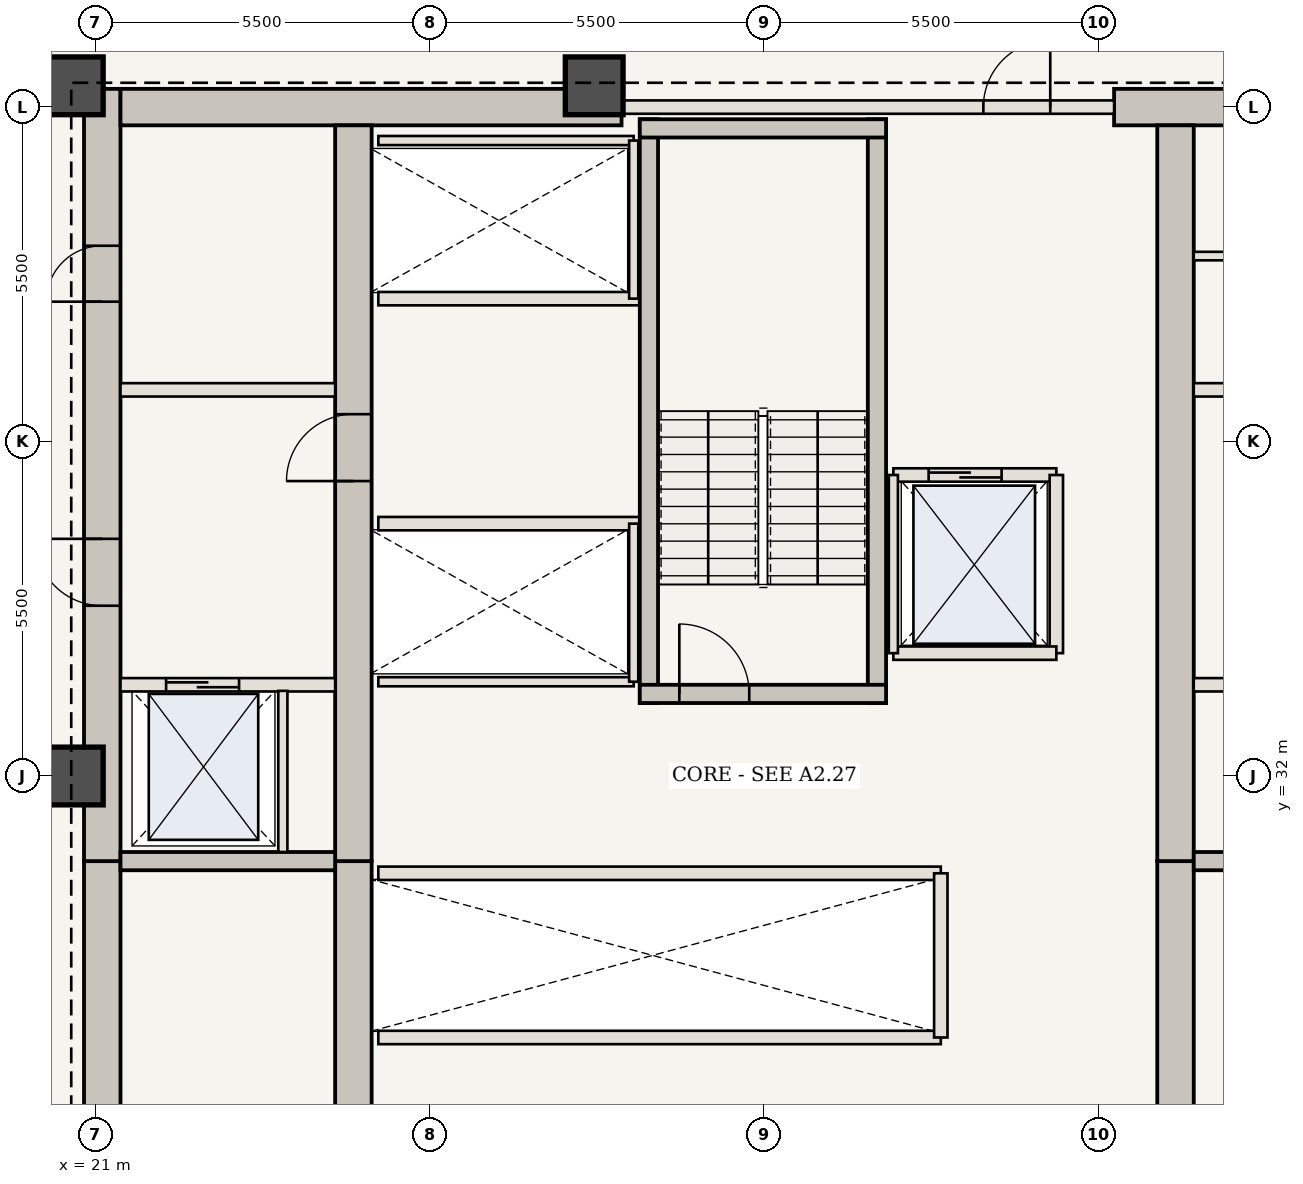
"""IFC4 building model, lengths in metres.
Left out: names, types, materials, properties, quantities, classifications, styles, units other than length and angle.
Written with IfcOpenShell. Run it as: python <this file> out.ifc"""

import sys

from ifc_helpers import new_model, si_unit, direction, frame, frame_2d, origin, origin_2d, place, context, subcontext, project, spatial, rectangle, extrude, element, fill, save


model = new_model("IFC4")
c1 = context("Model", 3, precision=1e-05, world=origin(), true_north=direction((0.0, 1.0)))
c2 = subcontext(c1, "Body", "Model", "MODEL_VIEW")
j1 = project(units=[si_unit("LENGTHUNIT", "METRE"), si_unit("PLANEANGLEUNIT", "RADIAN")], contexts=[c1])
p1 = place(None, origin())
s1 = spatial("IfcSite", under=j1, at=p1, CompositionType="ELEMENT")
p2 = place(p1, origin())
s2 = spatial("IfcBuilding", under=s1, at=p2, CompositionType="ELEMENT")
p3 = place(p2, frame((0.0, 0.0, 114.45)))
s3 = spatial("IfcBuildingStorey", under=s2, at=p3, CompositionType="ELEMENT", Elevation=114.45)
p4 = place(p3, frame((21.11, 20.65, 0.0), z_axis=(0.0, 0.0, 1.0), x_axis=(0.0, 1.0, 0.0)))
e1 = element("IfcWall", 1, at=p4, inside=s3, PredefinedType="SHEAR", context=c2, shape_type="SweptSolid", body=[
    extrude(rectangle(XDim=9.95, YDim=0.6, at=frame_2d((4.975, 0.0))), origin(), (0.0, 0.0, 1.0), 3.85),
])
p5 = place(p4, frame((1.1, 0.0, 0.0)))
e2 = element("IfcOpeningElement", 2, at=p5, cuts=e1, PredefinedType="OPENING", context=c2, shape_type="SweptSolid", body=[
    extrude(rectangle(XDim=1.15, YDim=2.15, at=frame_2d((0.575, 1.075))), frame((0.0, 0.31, 0.0), z_axis=(0.0, -1.0, 0.0), x_axis=(1.0, 0.0, 0.0)), (0.0, 0.0, 1.0), 0.62),
])
p6 = place(p3, frame((21.11, 30.6, 0.0), z_axis=(0.0, 0.0, 1.0), x_axis=(0.0, 1.0, 0.0)))
e3 = element("IfcWall", 3, at=p6, inside=s3, PredefinedType="SHEAR", context=c2, shape_type="SweptSolid", body=[
    extrude(rectangle(XDim=12.7, YDim=0.6, at=frame_2d((6.35, 0.0))), origin(), (0.0, 0.0, 1.0), 3.85),
])
p7 = place(p6, frame((4.2, 0.0, 0.0)))
e4 = element("IfcOpeningElement", 4, at=p7, cuts=e3, PredefinedType="OPENING", context=c2, shape_type="SweptSolid", body=[
    extrude(rectangle(XDim=1.1, YDim=2.15, at=frame_2d((0.55, 1.075))), frame((0.0, 0.31, 0.0), z_axis=(0.0, -1.0, 0.0), x_axis=(1.0, 0.0, 0.0)), (0.0, 0.0, 1.0), 0.62),
])
p8 = place(p6, frame((9.2, 0.0, 0.0)))
e5 = element("IfcOpeningElement", 5, at=p8, cuts=e3, PredefinedType="OPENING", context=c2, shape_type="SweptSolid", body=[
    extrude(rectangle(XDim=0.92, YDim=2.1, at=frame_2d((0.46, 1.05))), frame((0.0, 0.31, 0.0), z_axis=(0.0, -1.0, 0.0), x_axis=(1.0, 0.0, 0.0)), (0.0, 0.0, 1.0), 0.62),
])
p9 = place(p3, frame((21.41, 43.0, 0.0), z_axis=(0.0, 0.0, 1.0), x_axis=(1.0, 0.0, 0.0)))
e6 = element("IfcWall", 6, at=p9, inside=s3, PredefinedType="SHEAR", context=c2, shape_type="SweptSolid", body=[
    extrude(rectangle(XDim=8.24, YDim=0.6, at=frame_2d((4.12, 0.0))), origin(), (0.0, 0.0, 1.0), 3.85),
])
p10 = place(p3, frame((37.75, 43.0, 0.0), z_axis=(0.0, 0.0, 1.0), x_axis=(1.0, 0.0, 0.0)))
e7 = element("IfcWall", 7, at=p10, inside=s3, PredefinedType="SHEAR", context=c2, shape_type="SweptSolid", body=[
    extrude(rectangle(XDim=4.84, YDim=0.6, at=frame_2d((2.42, 0.0))), origin(), (0.0, 0.0, 1.0), 3.85),
])
p11 = place(p3, frame((25.24, 21.25, 0.0), z_axis=(0.0, 0.0, 1.0), x_axis=(0.0, 1.0, 0.0)))
e8 = element("IfcWall", 8, at=p11, inside=s3, PredefinedType="SHEAR", context=c2, shape_type="SweptSolid", body=[
    extrude(rectangle(XDim=9.35, YDim=0.6, at=frame_2d((4.675, 0.0))), origin(), (0.0, 0.0, 1.0), 3.85),
])
p12 = place(p3, frame((25.24, 30.6, 0.0), z_axis=(0.0, 0.0, 1.0), x_axis=(0.0, 1.0, 0.0)))
e9 = element("IfcWall", 9, at=p12, inside=s3, PredefinedType="SHEAR", context=c2, shape_type="SweptSolid", body=[
    extrude(rectangle(XDim=12.1, YDim=0.6, at=frame_2d((6.05, 0.0))), origin(), (0.0, 0.0, 1.0), 3.85),
])
p13 = place(p12, frame((6.25, 0.0, 0.0)))
e10 = element("IfcOpeningElement", 10, at=p13, cuts=e9, PredefinedType="OPENING", context=c2, shape_type="SweptSolid", body=[
    extrude(rectangle(XDim=1.1, YDim=2.15, at=frame_2d((0.55, 1.075))), frame((0.0, 0.31, 0.0), z_axis=(0.0, -1.0, 0.0), x_axis=(1.0, 0.0, 0.0)), (0.0, 0.0, 1.0), 0.62),
])
p14 = place(p3, frame((38.76, 21.25, 0.0), z_axis=(0.0, 0.0, 1.0), x_axis=(0.0, 1.0, 0.0)))
e11 = element("IfcWall", 11, at=p14, inside=s3, PredefinedType="SHEAR", context=c2, shape_type="SweptSolid", body=[
    extrude(rectangle(XDim=9.35, YDim=0.6, at=frame_2d((4.675, 0.0))), origin(), (0.0, 0.0, 1.0), 3.85),
])
p15 = place(p3, frame((38.76, 30.6, 0.0), z_axis=(0.0, 0.0, 1.0), x_axis=(0.0, 1.0, 0.0)))
e12 = element("IfcWall", 12, at=p15, inside=s3, PredefinedType="SHEAR", context=c2, shape_type="SweptSolid", body=[
    extrude(rectangle(XDim=12.1, YDim=0.6, at=frame_2d((6.05, 0.0))), origin(), (0.0, 0.0, 1.0), 3.85),
])
for number, where, z_axis, x_axis in (
    (13, (29.2, 43.35, 0.0), (0.0, 0.0, 1.0), (1.0, 0.0, 0.0)),
    (14, (20.65, 43.35, 0.0), (0.0, 0.0, 1.0), (1.0, 0.0, 0.0)),
    (15, (20.65, 32.0, 0.0), (0.0, 0.0, 1.0), (1.0, 0.0, 0.0)),
):
    element("IfcColumn", number, at=place(p3, frame(where, z_axis=z_axis, x_axis=x_axis)), inside=s3, PredefinedType="COLUMN", context=c2, shape_type="SweptSolid", body=[
        extrude(rectangle(XDim=0.95, YDim=0.95, at=origin_2d()), origin(), (0.0, 0.0, 1.0), 3.85),
    ])
for number, where, z_axis, x_axis in (
    (16, (21.41, 30.6, 0.0), (0.0, 0.0, 1.0), (1.0, 0.0, 0.0)),
    (17, (39.06, 30.6, 0.0), (0.0, 0.0, 1.0), (1.0, 0.0, 0.0)),
):
    element("IfcWall", number, at=place(p3, frame(where, z_axis=z_axis, x_axis=x_axis)), inside=s3, PredefinedType="SHEAR", context=c2, shape_type="SweptSolid", body=[
        extrude(rectangle(XDim=3.53, YDim=0.3, at=frame_2d((1.765, 0.0))), origin(), (0.0, 0.0, 1.0), 3.685),
    ])
p16 = place(p3, frame((21.41, 33.5, 0.0), z_axis=(0.0, 0.0, 1.0), x_axis=(1.0, 0.0, 0.0)))
e18 = element("IfcWall", 18, at=p16, inside=s3, PredefinedType="STANDARD", context=c2, shape_type="SweptSolid", body=[
    extrude(rectangle(XDim=3.53, YDim=0.22, at=frame_2d((1.765, 0.0))), origin(), (0.0, 0.0, 1.0), 3.685),
])
p17 = place(p16, frame((0.75, 0.0, 0.0)))
e19 = element("IfcOpeningElement", 19, at=p17, cuts=e18, PredefinedType="OPENING", context=c2, shape_type="SweptSolid", body=[
    extrude(rectangle(XDim=1.2, YDim=2.2, at=frame_2d((0.6, 1.1))), frame((0.0, 0.12, 0.0), z_axis=(0.0, -1.0, 0.0), x_axis=(1.0, 0.0, 0.0)), (0.0, 0.0, 1.0), 0.24),
])
p18 = place(p3, frame((24.08, 30.75, 0.0), z_axis=(0.0, 0.0, 1.0), x_axis=(0.0, 1.0, 0.0)))
e20 = element("IfcWall", 20, at=p18, inside=s3, PredefinedType="STANDARD", context=c2, shape_type="SweptSolid", body=[
    extrude(rectangle(XDim=2.65, YDim=0.15, at=frame_2d((1.325, 0.0))), origin(), (0.0, 0.0, 1.0), 3.685),
])
p19 = place(p3, frame((39.06, 33.5, 0.0), z_axis=(0.0, 0.0, 1.0), x_axis=(1.0, 0.0, 0.0)))
e21 = element("IfcWall", 21, at=p19, inside=s3, PredefinedType="STANDARD", context=c2, shape_type="SweptSolid", body=[
    extrude(rectangle(XDim=3.53, YDim=0.22, at=frame_2d((1.765, 0.0))), origin(), (0.0, 0.0, 1.0), 3.685),
])
p20 = place(p19, frame((1.55, 0.0, 0.0)))
e22 = element("IfcOpeningElement", 22, at=p20, cuts=e21, PredefinedType="OPENING", context=c2, shape_type="SweptSolid", body=[
    extrude(rectangle(XDim=1.2, YDim=2.2, at=frame_2d((0.6, 1.1))), frame((0.0, 0.12, 0.0), z_axis=(0.0, -1.0, 0.0), x_axis=(1.0, 0.0, 0.0)), (0.0, 0.0, 1.0), 0.24),
])
for number, where, z_axis, x_axis in (
    (23, (21.41, 38.35, 0.0), (0.0, 0.0, 1.0), (1.0, 0.0, 0.0)),
    (24, (39.06, 38.35, 0.0), (0.0, 0.0, 1.0), (1.0, 0.0, 0.0)),
):
    element("IfcWall", number, at=place(p3, frame(where, z_axis=z_axis, x_axis=x_axis)), inside=s3, PredefinedType="STANDARD", context=c2, shape_type="SweptSolid", body=[
        extrude(rectangle(XDim=3.53, YDim=0.22, at=frame_2d((1.765, 0.0))), origin(), (0.0, 0.0, 1.0), 3.685),
    ])
p21 = place(p3, frame((39.06, 40.55, 0.0), z_axis=(0.0, 0.0, 1.0), x_axis=(1.0, 0.0, 0.0)))
e25 = element("IfcWall", 25, at=p21, inside=s3, PredefinedType="STANDARD", context=c2, shape_type="SweptSolid", body=[
    extrude(rectangle(XDim=3.53, YDim=0.14, at=frame_2d((1.765, 0.0))), origin(), (0.0, 0.0, 1.0), 3.685),
])
for number, where, z_axis, x_axis in (
    (26, (25.65, 27.7, 0.0), (0.0, 0.0, 1.0), (1.0, 0.0, 0.0)),
    (27, (25.65, 30.4, 0.0), (0.0, 0.0, 1.0), (1.0, 0.0, 0.0)),
):
    element("IfcWall", number, at=place(p3, frame(where, z_axis=z_axis, x_axis=x_axis)), inside=s3, PredefinedType="STANDARD", context=c2, shape_type="SweptSolid", body=[
        extrude(rectangle(XDim=9.25, YDim=0.22, at=frame_2d((4.625, 0.0))), origin(), (0.0, 0.0, 1.0), 3.685),
    ])
p22 = place(p3, frame((34.9, 27.7, 0.0), z_axis=(0.0, 0.0, 1.0), x_axis=(0.0, 1.0, 0.0)))
e28 = element("IfcWall", 28, at=p22, inside=s3, PredefinedType="STANDARD", context=c2, shape_type="SweptSolid", body=[
    extrude(rectangle(XDim=2.7, YDim=0.22, at=frame_2d((1.35, 0.0))), origin(), (0.0, 0.0, 1.0), 3.685),
])
p23 = place(p3, frame((25.65, 36.15, 0.0), z_axis=(0.0, 0.0, 1.0), x_axis=(1.0, 0.0, 0.0)))
e29 = element("IfcWall", 29, at=p23, inside=s3, PredefinedType="STANDARD", context=c2, shape_type="SweptSolid", body=[
    extrude(rectangle(XDim=4.3, YDim=0.22, at=frame_2d((2.15, 0.0))), origin(), (0.0, 0.0, 1.0), 3.685),
])
p24 = place(p3, frame((25.65, 33.55, 0.0), z_axis=(0.0, 0.0, 1.0), x_axis=(1.0, 0.0, 0.0)))
e30 = element("IfcWall", 30, at=p24, inside=s3, PredefinedType="STANDARD", context=c2, shape_type="SweptSolid", body=[
    extrude(rectangle(XDim=4.2, YDim=0.15, at=frame_2d((2.1, 0.0))), origin(), (0.0, 0.0, 1.0), 3.685),
])
p25 = place(p3, frame((29.85, 33.55, 0.0), z_axis=(0.0, 0.0, 1.0), x_axis=(0.0, 1.0, 0.0)))
e31 = element("IfcWall", 31, at=p25, inside=s3, PredefinedType="STANDARD", context=c2, shape_type="SweptSolid", body=[
    extrude(rectangle(XDim=2.6, YDim=0.15, at=frame_2d((1.3, 0.0))), origin(), (0.0, 0.0, 1.0), 3.685),
])
p26 = place(p3, frame((25.65, 39.85, 0.0), z_axis=(0.0, 0.0, 1.0), x_axis=(1.0, 0.0, 0.0)))
e32 = element("IfcWall", 32, at=p26, inside=s3, PredefinedType="STANDARD", context=c2, shape_type="SweptSolid", body=[
    extrude(rectangle(XDim=4.3, YDim=0.22, at=frame_2d((2.15, 0.0))), origin(), (0.0, 0.0, 1.0), 3.685),
])
p27 = place(p3, frame((25.65, 42.45, 0.0), z_axis=(0.0, 0.0, 1.0), x_axis=(1.0, 0.0, 0.0)))
e33 = element("IfcWall", 33, at=p27, inside=s3, PredefinedType="STANDARD", context=c2, shape_type="SweptSolid", body=[
    extrude(rectangle(XDim=4.2, YDim=0.15, at=frame_2d((2.1, 0.0))), origin(), (0.0, 0.0, 1.0), 3.685),
])
p28 = place(p3, frame((29.85, 39.85, 0.0), z_axis=(0.0, 0.0, 1.0), x_axis=(0.0, 1.0, 0.0)))
e34 = element("IfcWall", 34, at=p28, inside=s3, PredefinedType="STANDARD", context=c2, shape_type="SweptSolid", body=[
    extrude(rectangle(XDim=2.6, YDim=0.15, at=frame_2d((1.3, 0.0))), origin(), (0.0, 0.0, 1.0), 3.685),
])
for number, where, z_axis, x_axis in (
    (35, (30.1, 33.2, 0.0), (0.0, 0.0, 1.0), (0.0, 1.0, 0.0)),
    (36, (33.85, 33.2, 0.0), (0.0, 0.0, 1.0), (0.0, 1.0, 0.0)),
):
    element("IfcWall", number, at=place(p3, frame(where, z_axis=z_axis, x_axis=x_axis)), inside=s3, PredefinedType="SHEAR", context=c2, shape_type="SweptSolid", body=[
        extrude(rectangle(XDim=9.6, YDim=0.3, at=frame_2d((4.8, 0.0))), origin(), (0.0, 0.0, 1.0), 3.685),
    ])
p29 = place(p3, frame((29.95, 33.35, 0.0), z_axis=(0.0, 0.0, 1.0), x_axis=(1.0, 0.0, 0.0)))
e37 = element("IfcWall", 37, at=p29, inside=s3, PredefinedType="SHEAR", context=c2, shape_type="SweptSolid", body=[
    extrude(rectangle(XDim=4.05, YDim=0.3, at=frame_2d((2.025, 0.0))), origin(), (0.0, 0.0, 1.0), 3.685),
])
p30 = place(p29, frame((0.65, 0.0, 0.0)))
e38 = element("IfcOpeningElement", 38, at=p30, cuts=e37, PredefinedType="OPENING", context=c2, shape_type="SweptSolid", body=[
    extrude(rectangle(XDim=1.15, YDim=2.15, at=frame_2d((0.575, 1.075))), frame((0.0, 0.16, 0.0), z_axis=(0.0, -1.0, 0.0), x_axis=(1.0, 0.0, 0.0)), (0.0, 0.0, 1.0), 0.32),
])
p31 = place(p3, frame((29.95, 42.65, 0.0), z_axis=(0.0, 0.0, 1.0), x_axis=(1.0, 0.0, 0.0)))
e39 = element("IfcWall", 39, at=p31, inside=s3, PredefinedType="SHEAR", context=c2, shape_type="SweptSolid", body=[
    extrude(rectangle(XDim=4.05, YDim=0.3, at=frame_2d((2.025, 0.0))), origin(), (0.0, 0.0, 1.0), 3.685),
])
p32 = place(p3, frame((29.65, 43.0, 0.0), z_axis=(0.0, 0.0, 1.0), x_axis=(1.0, 0.0, 0.0)))
e40 = element("IfcWall", 40, at=p32, inside=s3, PredefinedType="STANDARD", context=c2, shape_type="SweptSolid", body=[
    extrude(rectangle(XDim=8.1, YDim=0.22, at=frame_2d((4.05, 0.0))), origin(), (0.0, 0.0, 1.0), 3.685),
])
p33 = place(p32, frame((5.95, 0.0, 0.0)))
e41 = element("IfcOpeningElement", 41, at=p33, cuts=e40, PredefinedType="OPENING", context=c2, shape_type="SweptSolid", body=[
    extrude(rectangle(XDim=1.1, YDim=2.15, at=frame_2d((0.55, 1.075))), frame((0.0, 0.12, 0.0), z_axis=(0.0, -1.0, 0.0), x_axis=(1.0, 0.0, 0.0)), (0.0, 0.0, 1.0), 0.24),
])
p34 = place(p3, frame((34.12, 36.95, 0.0), z_axis=(0.0, 0.0, 1.0), x_axis=(1.0, 0.0, 0.0)))
e42 = element("IfcWall", 42, at=p34, inside=s3, PredefinedType="STANDARD", context=c2, shape_type="SweptSolid", body=[
    extrude(rectangle(XDim=2.68, YDim=0.22, at=frame_2d((1.34, 0.0))), origin(), (0.0, 0.0, 1.0), 3.685),
])
p35 = place(p34, frame((0.58, 0.0, 0.0)))
e43 = element("IfcOpeningElement", 43, at=p35, cuts=e42, PredefinedType="OPENING", context=c2, shape_type="SweptSolid", body=[
    extrude(rectangle(XDim=1.2, YDim=2.2, at=frame_2d((0.6, 1.1))), frame((0.0, 0.12, 0.0), z_axis=(0.0, -1.0, 0.0), x_axis=(1.0, 0.0, 0.0)), (0.0, 0.0, 1.0), 0.24),
])
p36 = place(p3, frame((36.8, 34.02, 0.0), z_axis=(0.0, 0.0, 1.0), x_axis=(0.0, 1.0, 0.0)))
e44 = element("IfcWall", 44, at=p36, inside=s3, PredefinedType="STANDARD", context=c2, shape_type="SweptSolid", body=[
    extrude(rectangle(XDim=2.93, YDim=0.22, at=frame_2d((1.465, 0.0))), origin(), (0.0, 0.0, 1.0), 3.685),
])
p37 = place(p3, frame((34.12, 34.02, 0.0), z_axis=(0.0, 0.0, 1.0), x_axis=(1.0, 0.0, 0.0)))
e45 = element("IfcWall", 45, at=p37, inside=s3, PredefinedType="STANDARD", context=c2, shape_type="SweptSolid", body=[
    extrude(rectangle(XDim=2.68, YDim=0.22, at=frame_2d((1.34, 0.0))), origin(), (0.0, 0.0, 1.0), 3.685),
])
p38 = place(p3, frame((34.12, 34.02, 0.0), z_axis=(0.0, 0.0, 1.0), x_axis=(0.0, 1.0, 0.0)))
e46 = element("IfcWall", 46, at=p38, inside=s3, PredefinedType="STANDARD", context=c2, shape_type="SweptSolid", body=[
    extrude(rectangle(XDim=2.93, YDim=0.15, at=frame_2d((1.465, 0.0))), origin(), (0.0, 0.0, 1.0), 3.685),
])
p39 = place(p7, origin())
e47 = element("IfcDoor", 47, at=p39, inside=s3, OperationType="SINGLE_SWING_RIGHT", PredefinedType="DOOR", context=c2, shape_type="SweptSolid", body=[
    extrude(rectangle(XDim=1.1, YDim=2.15, at=frame_2d((0.55, 1.075))), frame((0.0, 0.025, 0.0), z_axis=(0.0, -1.0, 0.0), x_axis=(1.0, 0.0, 0.0)), (0.0, 0.0, 1.0), 0.05),
])
fill(e4, e47)
p40 = place(p13, origin())
e48 = element("IfcDoor", 48, at=p40, inside=s3, OperationType="SINGLE_SWING_LEFT", PredefinedType="DOOR", context=c2, shape_type="SweptSolid", body=[
    extrude(rectangle(XDim=1.1, YDim=2.15, at=frame_2d((0.55, 1.075))), frame((0.0, 0.025, 0.0), z_axis=(0.0, -1.0, 0.0), x_axis=(1.0, 0.0, 0.0)), (0.0, 0.0, 1.0), 0.05),
])
fill(e10, e48)
p41 = place(p8, origin())
e49 = element("IfcDoor", 49, at=p41, inside=s3, OperationType="SINGLE_SWING_LEFT", PredefinedType="DOOR", context=c2, shape_type="SweptSolid", body=[
    extrude(rectangle(XDim=0.92, YDim=2.1, at=frame_2d((0.46, 1.05))), frame((0.0, 0.025, 0.0), z_axis=(0.0, -1.0, 0.0), x_axis=(1.0, 0.0, 0.0)), (0.0, 0.0, 1.0), 0.05),
])
fill(e5, e49)
p42 = place(p17, origin())
e50 = element("IfcDoor", 50, at=p42, inside=s3, OperationType="DOUBLE_DOOR_SLIDING", PredefinedType="DOOR", context=c2, shape_type="SweptSolid", body=[
    extrude(rectangle(XDim=1.2, YDim=2.2, at=frame_2d((0.6, 1.1))), frame((0.0, 0.025, 0.0), z_axis=(0.0, -1.0, 0.0), x_axis=(1.0, 0.0, 0.0)), (0.0, 0.0, 1.0), 0.05),
])
fill(e19, e50)
p43 = place(p30, origin())
e51 = element("IfcDoor", 51, at=p43, inside=s3, OperationType="SINGLE_SWING_LEFT", PredefinedType="DOOR", context=c2, shape_type="SweptSolid", body=[
    extrude(rectangle(XDim=1.15, YDim=2.15, at=frame_2d((0.575, 1.075))), frame((0.0, 0.025, 0.0), z_axis=(0.0, -1.0, 0.0), x_axis=(1.0, 0.0, 0.0)), (0.0, 0.0, 1.0), 0.05),
])
fill(e38, e51)
p44 = place(p33, origin())
e52 = element("IfcDoor", 52, at=p44, inside=s3, OperationType="SINGLE_SWING_RIGHT", PredefinedType="DOOR", context=c2, shape_type="SweptSolid", body=[
    extrude(rectangle(XDim=1.1, YDim=2.15, at=frame_2d((0.55, 1.075))), frame((0.0, 0.025, 0.0), z_axis=(0.0, -1.0, 0.0), x_axis=(1.0, 0.0, 0.0)), (0.0, 0.0, 1.0), 0.05),
])
fill(e41, e52)
p45 = place(p35, origin())
e53 = element("IfcDoor", 53, at=p45, inside=s3, OperationType="DOUBLE_DOOR_SLIDING", PredefinedType="DOOR", context=c2, shape_type="SweptSolid", body=[
    extrude(rectangle(XDim=1.2, YDim=2.2, at=frame_2d((0.6, 1.1))), frame((0.0, 0.025, 0.0), z_axis=(0.0, -1.0, 0.0), x_axis=(1.0, 0.0, 0.0)), (0.0, 0.0, 1.0), 0.05),
])
fill(e43, e53)
save(model, sys.argv[1])
